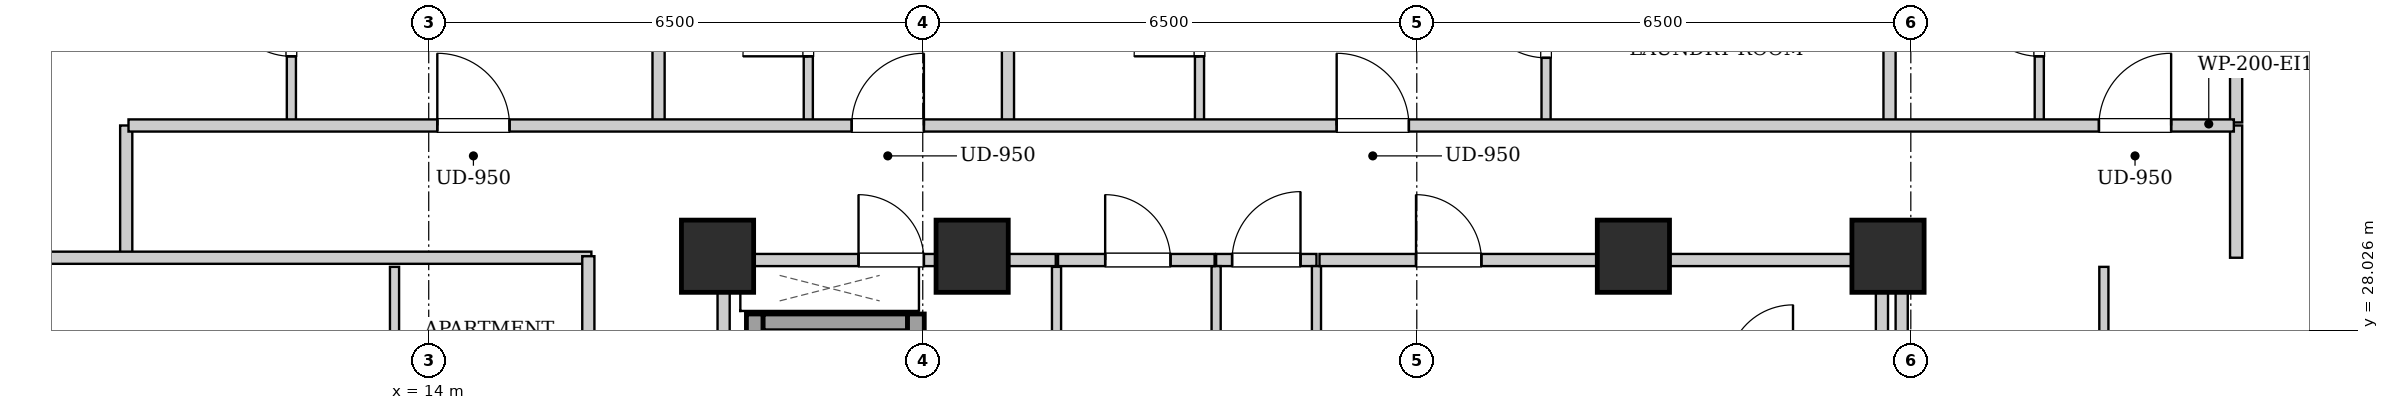
"""IFC4 building model, lengths in metres.
Left out: names, types, materials, properties, quantities, classifications, styles, units other than length and angle.
Written with IfcOpenShell. Run it as: python <this file> out.ifc"""

import sys

from ifc_helpers import new_model, si_unit, direction, frame, frame_2d, origin, origin_2d, place, context, subcontext, project, spatial, rectangle, extrude, element, fill, save


model = new_model("IFC4")
c1 = context("Model", 3, precision=1e-05, world=origin(), true_north=direction((0.0, 1.0)))
c2 = subcontext(c1, "Body", "Model", "MODEL_VIEW")
j1 = project(units=[si_unit("LENGTHUNIT", "METRE"), si_unit("PLANEANGLEUNIT", "RADIAN")], contexts=[c1])
p1 = place(None, origin())
s1 = spatial("IfcSite", under=j1, at=p1, CompositionType="ELEMENT")
p2 = place(p1, origin())
s2 = spatial("IfcBuilding", under=s1, at=p2, CompositionType="ELEMENT")
p3 = place(p2, frame((0.0, 0.0, 140.65)))
s3 = spatial("IfcBuildingStorey", under=s2, at=p3, CompositionType="ELEMENT", Elevation=140.65)
for number, where, z_axis, x_axis in (
    (1, (17.8, 29.0, 0.0), (0.0, 0.0, 1.0), (1.0, 0.0, 0.0)),
    (2, (21.15, 29.0, 0.0), (0.0, 0.0, 1.0), (1.0, 0.0, 0.0)),
    (3, (29.85, 29.0, 0.0), (0.0, 0.0, 1.0), (1.0, 0.0, 0.0)),
    (4, (33.2, 29.0, 0.0), (0.0, 0.0, 1.0), (1.0, 0.0, 0.0)),
):
    element("IfcColumn", number, at=place(p3, frame(where, z_axis=z_axis, x_axis=x_axis)), inside=s3, PredefinedType="COLUMN", context=c2, shape_type="SweptSolid", body=[
        extrude(rectangle(XDim=0.95, YDim=0.95, at=origin_2d()), origin(), (0.0, 0.0, 1.0), 3.25),
    ])
p4 = place(p3, frame((18.29, 24.1, 0.0), z_axis=(0.0, 0.0, 1.0), x_axis=(0.0, 1.0, 0.0)))
e5 = element("IfcWall", 5, at=p4, inside=s3, PredefinedType="SHEAR", context=c2, shape_type="SweptSolid", body=[
    extrude(rectangle(XDim=4.14, YDim=0.22, at=frame_2d((2.07, 0.0))), origin(), (0.0, 0.0, 1.0), 2.99),
])
p5 = place(p3, frame((18.4, 28.13, 0.0), z_axis=(0.0, 0.0, 1.0), x_axis=(1.0, 0.0, 0.0)))
e6 = element("IfcWall", 6, at=p5, inside=s3, PredefinedType="SHEAR", context=c2, shape_type="SweptSolid", body=[
    extrude(rectangle(XDim=1.9, YDim=0.22, at=frame_2d((0.95, 0.0))), origin(), (0.0, 0.0, 1.0), 2.99),
])
p6 = place(p3, frame((20.41, 26.06, 0.0), z_axis=(0.0, 0.0, 1.0), x_axis=(0.0, 1.0, 0.0)))
e7 = element("IfcWall", 7, at=p6, inside=s3, PredefinedType="SHEAR", context=c2, shape_type="SweptSolid", body=[
    extrude(rectangle(XDim=2.18, YDim=0.22, at=frame_2d((1.09, 0.0))), origin(), (0.0, 0.0, 1.0), 2.99),
])
for number, where, z_axis, x_axis in (
    (8, (17.88, 24.12, 0.0), (0.0, 0.0, 1.0), (0.0, 1.0, 0.0)),
    (9, (33.12, 24.12, 0.0), (0.0, 0.0, 1.0), (0.0, 1.0, 0.0)),
):
    element("IfcWall", number, at=place(p3, frame(where, z_axis=z_axis, x_axis=x_axis)), inside=s3, PredefinedType="PARTITIONING", context=c2, shape_type="SweptSolid", body=[
        extrude(rectangle(XDim=4.76, YDim=0.16, at=frame_2d((2.38, 0.0))), origin(), (0.0, 0.0, 1.0), 2.99),
    ])
p7 = place(p3, frame((24.36, 28.95, 0.0), z_axis=(0.0, 0.0, 1.0), x_axis=(1.0, 0.0, 0.0)))
e10 = element("IfcWall", 10, at=p7, inside=s3, PredefinedType="PARTITIONING", context=c2, shape_type="SweptSolid", body=[
    extrude(rectangle(XDim=1.32, YDim=0.16, at=frame_2d((0.66, 0.0))), origin(), (0.0, 0.0, 1.0), 2.426),
])
p8 = place(p7, frame((0.21, 0.0, 0.0)))
e11 = element("IfcOpeningElement", 11, at=p8, cuts=e10, PredefinedType="OPENING", context=c2, shape_type="SweptSolid", body=[
    extrude(rectangle(XDim=0.9, YDim=2.05, at=frame_2d((0.45, 1.025))), frame((0.0, 0.09, 0.0), z_axis=(0.0, -1.0, 0.0), x_axis=(1.0, 0.0, 0.0)), (0.0, 0.0, 1.0), 0.18),
])
p9 = place(p3, frame((17.96, 28.95, 0.0), z_axis=(0.0, 0.0, 1.0), x_axis=(1.0, 0.0, 0.0)))
e12 = element("IfcWall", 12, at=p9, inside=s3, PredefinedType="PARTITIONING", context=c2, shape_type="SweptSolid", body=[
    extrude(rectangle(XDim=4.29, YDim=0.16, at=frame_2d((2.145, 0.0))), origin(), (0.0, 0.0, 1.0), 2.426),
])
p10 = place(p9, frame((1.695, 0.0, 0.0)))
e13 = element("IfcOpeningElement", 13, at=p10, cuts=e12, PredefinedType="OPENING", context=c2, shape_type="SweptSolid", body=[
    extrude(rectangle(XDim=0.86, YDim=2.05, at=frame_2d((0.43, 1.025))), frame((0.0, 0.09, 0.0), z_axis=(0.0, -1.0, 0.0), x_axis=(1.0, 0.0, 0.0)), (0.0, 0.0, 1.0), 0.18),
])
for number, where, z_axis, x_axis in (
    (14, (24.36, 25.0, 0.0), (0.0, 0.0, 1.0), (0.0, 1.0, 0.0)),
    (15, (25.68, 25.0, 0.0), (0.0, 0.0, 1.0), (0.0, 1.0, 0.0)),
):
    element("IfcWall", number, at=place(p3, frame(where, z_axis=z_axis, x_axis=x_axis)), inside=s3, PredefinedType="PARTITIONING", context=c2, shape_type="SweptSolid", body=[
        extrude(rectangle(XDim=3.87, YDim=0.12, at=frame_2d((1.935, 0.0))), origin(), (0.0, 0.0, 1.0), 2.99),
    ])
p11 = place(p3, frame((22.26, 25.0, 0.0), z_axis=(0.0, 0.0, 1.0), x_axis=(0.0, 1.0, 0.0)))
e16 = element("IfcWall", 16, at=p11, inside=s3, PredefinedType="PARTITIONING", context=c2, shape_type="SweptSolid", body=[
    extrude(rectangle(XDim=3.86, YDim=0.12, at=frame_2d((1.93, 0.0))), origin(), (0.0, 0.0, 1.0), 2.99),
])
p12 = place(p3, frame((22.28, 28.95, 0.0), z_axis=(0.0, 0.0, 1.0), x_axis=(1.0, 0.0, 0.0)))
e17 = element("IfcWall", 17, at=p12, inside=s3, PredefinedType="PARTITIONING", context=c2, shape_type="SweptSolid", body=[
    extrude(rectangle(XDim=2.06, YDim=0.16, at=frame_2d((1.03, 0.0))), origin(), (0.0, 0.0, 1.0), 2.426),
])
p13 = place(p12, frame((0.62, 0.0, 0.0)))
e18 = element("IfcOpeningElement", 18, at=p13, cuts=e17, PredefinedType="OPENING", context=c2, shape_type="SweptSolid", body=[
    extrude(rectangle(XDim=0.86, YDim=2.05, at=frame_2d((0.43, 1.025))), frame((0.0, 0.09, 0.0), z_axis=(0.0, -1.0, 0.0), x_axis=(1.0, 0.0, 0.0)), (0.0, 0.0, 1.0), 0.18),
])
p14 = place(p3, frame((25.72, 28.95, 0.0), z_axis=(0.0, 0.0, 1.0), x_axis=(1.0, 0.0, 0.0)))
e19 = element("IfcWall", 19, at=p14, inside=s3, PredefinedType="PARTITIONING", context=c2, shape_type="SweptSolid", body=[
    extrude(rectangle(XDim=7.32, YDim=0.16, at=frame_2d((3.66, 0.0))), origin(), (0.0, 0.0, 1.0), 2.426),
])
p15 = place(p14, frame((1.27, 0.0, 0.0)))
e20 = element("IfcOpeningElement", 20, at=p15, cuts=e19, PredefinedType="OPENING", context=c2, shape_type="SweptSolid", body=[
    extrude(rectangle(XDim=0.86, YDim=2.05, at=frame_2d((0.43, 1.025))), frame((0.0, 0.09, 0.0), z_axis=(0.0, -1.0, 0.0), x_axis=(1.0, 0.0, 0.0)), (0.0, 0.0, 1.0), 0.18),
])
for number, where, z_axis, x_axis in (
    (21, (10.02, 28.98, 0.0), (0.0, 0.0, 1.0), (0.0, 1.0, 0.0)),
    (22, (37.78, 28.98, 0.0), (0.0, 0.0, 1.0), (0.0, 1.0, 0.0)),
):
    element("IfcWall", number, at=place(p3, frame(where, z_axis=z_axis, x_axis=x_axis)), inside=s3, PredefinedType="PARTITIONING", context=c2, shape_type="SweptSolid", body=[
        extrude(rectangle(XDim=1.74, YDim=0.16, at=frame_2d((0.87, 0.0))), origin(), (0.0, 0.0, 1.0), 2.99),
    ])
p16 = place(p3, frame((7.78, 28.98, 0.0), z_axis=(0.0, 0.0, 1.0), x_axis=(1.0, 0.0, 0.0)))
e23 = element("IfcWall", 23, at=p16, inside=s3, PredefinedType="PARTITIONING", context=c2, shape_type="SweptSolid", body=[
    extrude(rectangle(XDim=8.36, YDim=0.16, at=frame_2d((4.18, 0.0))), origin(), (0.0, 0.0, 1.0), 2.426),
])
p17 = place(p3, frame((12.193, 30.76, 0.0), z_axis=(0.0, 0.0, 1.0), x_axis=(0.0, 1.0, 0.0)))
e24 = element("IfcWall", 24, at=p17, inside=s3, PredefinedType="PARTITIONING", context=c2, shape_type="SweptSolid", body=[
    extrude(rectangle(XDim=2.6, YDim=0.12, at=frame_2d((1.3, 0.0))), origin(), (0.0, 0.0, 1.0), 2.99),
])
p18 = place(p17, frame((0.87, 0.0, 0.0)))
e25 = element("IfcOpeningElement", 25, at=p18, cuts=e24, PredefinedType="OPENING", context=c2, shape_type="SweptSolid", body=[
    extrude(rectangle(XDim=0.86, YDim=2.05, at=frame_2d((0.43, 1.025))), frame((0.0, 0.07, 0.0), z_axis=(0.0, -1.0, 0.0), x_axis=(1.0, 0.0, 0.0)), (0.0, 0.0, 1.0), 0.14),
])
p19 = place(p3, frame((17.024, 30.76, 0.0), z_axis=(0.0, 0.0, 1.0), x_axis=(0.0, 1.0, 0.0)))
e26 = element("IfcWall", 26, at=p19, inside=s3, PredefinedType="PARTITIONING", context=c2, shape_type="SweptSolid", body=[
    extrude(rectangle(XDim=12.26, YDim=0.16, at=frame_2d((6.13, 0.0))), origin(), (0.0, 0.0, 1.0), 2.99),
])
p20 = place(p3, frame((18.994, 30.76, 0.0), z_axis=(0.0, 0.0, 1.0), x_axis=(0.0, 1.0, 0.0)))
e27 = element("IfcWall", 27, at=p20, inside=s3, PredefinedType="PARTITIONING", context=c2, shape_type="SweptSolid", body=[
    extrude(rectangle(XDim=2.6, YDim=0.12, at=frame_2d((1.3, 0.0))), origin(), (0.0, 0.0, 1.0), 2.99),
])
p21 = place(p20, frame((0.87, 0.0, 0.0)))
e28 = element("IfcOpeningElement", 28, at=p21, cuts=e27, PredefinedType="OPENING", context=c2, shape_type="SweptSolid", body=[
    extrude(rectangle(XDim=0.86, YDim=2.05, at=frame_2d((0.43, 1.025))), frame((0.0, 0.07, 0.0), z_axis=(0.0, -1.0, 0.0), x_axis=(1.0, 0.0, 0.0)), (0.0, 0.0, 1.0), 0.14),
])
p22 = place(p3, frame((21.621, 30.76, 0.0), z_axis=(0.0, 0.0, 1.0), x_axis=(0.0, 1.0, 0.0)))
e29 = element("IfcWall", 29, at=p22, inside=s3, PredefinedType="PARTITIONING", context=c2, shape_type="SweptSolid", body=[
    extrude(rectangle(XDim=12.26, YDim=0.16, at=frame_2d((6.13, 0.0))), origin(), (0.0, 0.0, 1.0), 2.99),
])
p23 = place(p3, frame((24.141, 30.76, 0.0), z_axis=(0.0, 0.0, 1.0), x_axis=(0.0, 1.0, 0.0)))
e30 = element("IfcWall", 30, at=p23, inside=s3, PredefinedType="PARTITIONING", context=c2, shape_type="SweptSolid", body=[
    extrude(rectangle(XDim=2.6, YDim=0.12, at=frame_2d((1.3, 0.0))), origin(), (0.0, 0.0, 1.0), 2.99),
])
p24 = place(p23, frame((0.87, 0.0, 0.0)))
e31 = element("IfcOpeningElement", 31, at=p24, cuts=e30, PredefinedType="OPENING", context=c2, shape_type="SweptSolid", body=[
    extrude(rectangle(XDim=0.86, YDim=2.05, at=frame_2d((0.43, 1.025))), frame((0.0, 0.07, 0.0), z_axis=(0.0, -1.0, 0.0), x_axis=(1.0, 0.0, 0.0)), (0.0, 0.0, 1.0), 0.14),
])
p25 = place(p3, frame((28.701, 30.76, 0.0), z_axis=(0.0, 0.0, 1.0), x_axis=(0.0, 1.0, 0.0)))
e32 = element("IfcWall", 32, at=p25, inside=s3, PredefinedType="PARTITIONING", context=c2, shape_type="SweptSolid", body=[
    extrude(rectangle(XDim=2.6, YDim=0.12, at=frame_2d((1.3, 0.0))), origin(), (0.0, 0.0, 1.0), 2.99),
])
p26 = place(p25, frame((0.85, 0.0, 0.0)))
e33 = element("IfcOpeningElement", 33, at=p26, cuts=e32, PredefinedType="OPENING", context=c2, shape_type="SweptSolid", body=[
    extrude(rectangle(XDim=0.9, YDim=2.05, at=frame_2d((0.45, 1.025))), frame((0.0, 0.07, 0.0), z_axis=(0.0, -1.0, 0.0), x_axis=(1.0, 0.0, 0.0)), (0.0, 0.0, 1.0), 0.14),
])
p27 = place(p3, frame((37.78, 30.76, 0.0), z_axis=(0.0, 0.0, 1.0), x_axis=(0.0, 1.0, 0.0)))
e34 = element("IfcWall", 34, at=p27, inside=s3, PredefinedType="PARTITIONING", context=c2, shape_type="SweptSolid", body=[
    extrude(rectangle(XDim=2.66, YDim=0.16, at=frame_2d((1.33, 0.0))), origin(), (0.0, 0.0, 1.0), 2.99),
])
p28 = place(p3, frame((33.22, 30.76, 0.0), z_axis=(0.0, 0.0, 1.0), x_axis=(0.0, 1.0, 0.0)))
e35 = element("IfcWall", 35, at=p28, inside=s3, PredefinedType="PARTITIONING", context=c2, shape_type="SweptSolid", body=[
    extrude(rectangle(XDim=10.28, YDim=0.16, at=frame_2d((5.14, 0.0))), origin(), (0.0, 0.0, 1.0), 2.426),
])
p29 = place(p3, frame((35.19, 30.76, 0.0), z_axis=(0.0, 0.0, 1.0), x_axis=(0.0, 1.0, 0.0)))
e36 = element("IfcWall", 36, at=p29, inside=s3, PredefinedType="PARTITIONING", context=c2, shape_type="SweptSolid", body=[
    extrude(rectangle(XDim=2.6, YDim=0.12, at=frame_2d((1.3, 0.0))), origin(), (0.0, 0.0, 1.0), 2.99),
])
p30 = place(p29, frame((0.87, 0.0, 0.0)))
e37 = element("IfcOpeningElement", 37, at=p30, cuts=e36, PredefinedType="OPENING", context=c2, shape_type="SweptSolid", body=[
    extrude(rectangle(XDim=0.86, YDim=2.05, at=frame_2d((0.43, 1.025))), frame((0.0, 0.07, 0.0), z_axis=(0.0, -1.0, 0.0), x_axis=(1.0, 0.0, 0.0)), (0.0, 0.0, 1.0), 0.14),
])
p31 = place(p3, frame((13.55, 23.527, 0.0), z_axis=(0.0, 0.0, 1.0), x_axis=(0.0, 1.0, 0.0)))
e38 = element("IfcWall", 38, at=p31, inside=s3, PredefinedType="PARTITIONING", context=c2, shape_type="SweptSolid", body=[
    extrude(rectangle(XDim=5.333, YDim=0.12, at=frame_2d((2.667, 0.0))), origin(), (0.0, 0.0, 1.0), 2.99),
])
p32 = place(p31, frame((2.216, 0.0, 0.0)))
e39 = element("IfcOpeningElement", 39, at=p32, cuts=e38, PredefinedType="OPENING", context=c2, shape_type="SweptSolid", body=[
    extrude(rectangle(XDim=0.9, YDim=2.05, at=frame_2d((0.45, 1.025))), frame((0.0, 0.07, 0.0), z_axis=(0.0, -1.0, 0.0), x_axis=(1.0, 0.0, 0.0)), (0.0, 0.0, 1.0), 0.14),
])
p33 = place(p3, frame((36.04, 24.552, 0.0), z_axis=(0.0, 0.0, 1.0), x_axis=(0.0, 1.0, 0.0)))
e40 = element("IfcWall", 40, at=p33, inside=s3, PredefinedType="PARTITIONING", context=c2, shape_type="SweptSolid", body=[
    extrude(rectangle(XDim=4.308, YDim=0.12, at=frame_2d((2.154, 0.0))), origin(), (0.0, 0.0, 1.0), 2.99),
])
p34 = place(p33, frame((1.704, 0.0, 0.0)))
e41 = element("IfcOpeningElement", 41, at=p34, cuts=e40, PredefinedType="OPENING", context=c2, shape_type="SweptSolid", body=[
    extrude(rectangle(XDim=0.9, YDim=2.05, at=frame_2d((0.45, 1.025))), frame((0.0, 0.07, 0.0), z_axis=(0.0, -1.0, 0.0), x_axis=(1.0, 0.0, 0.0)), (0.0, 0.0, 1.0), 0.14),
])
p35 = place(p3, frame((10.05, 30.72, 0.0), z_axis=(0.0, 0.0, 1.0), x_axis=(1.0, 0.0, 0.0)))
e42 = element("IfcWall", 42, at=p35, inside=s3, PredefinedType="PARTITIONING", context=c2, shape_type="SweptSolid", body=[
    extrude(rectangle(XDim=27.7, YDim=0.16, at=frame_2d((13.85, 0.0))), origin(), (0.0, 0.0, 1.0), 2.99),
])
p36 = place(p35, frame((4.063, 0.0, 0.0)))
e43 = element("IfcOpeningElement", 43, at=p36, cuts=e42, PredefinedType="OPENING", context=c2, shape_type="SweptSolid", body=[
    extrude(rectangle(XDim=0.95, YDim=2.1, at=frame_2d((0.475, 1.05))), frame((0.0, 0.09, 0.0), z_axis=(0.0, -1.0, 0.0), x_axis=(1.0, 0.0, 0.0)), (0.0, 0.0, 1.0), 0.18),
])
p37 = place(p35, frame((9.515, 0.0, 0.0)))
e44 = element("IfcOpeningElement", 44, at=p37, cuts=e42, PredefinedType="OPENING", context=c2, shape_type="SweptSolid", body=[
    extrude(rectangle(XDim=0.95, YDim=2.1, at=frame_2d((0.475, 1.05))), frame((0.0, 0.09, 0.0), z_axis=(0.0, -1.0, 0.0), x_axis=(1.0, 0.0, 0.0)), (0.0, 0.0, 1.0), 0.18),
])
p38 = place(p35, frame((15.896, 0.0, 0.0)))
e45 = element("IfcOpeningElement", 45, at=p38, cuts=e42, PredefinedType="OPENING", context=c2, shape_type="SweptSolid", body=[
    extrude(rectangle(XDim=0.95, YDim=2.1, at=frame_2d((0.475, 1.05))), frame((0.0, 0.09, 0.0), z_axis=(0.0, -1.0, 0.0), x_axis=(1.0, 0.0, 0.0)), (0.0, 0.0, 1.0), 0.18),
])
p39 = place(p35, frame((25.925, 0.0, 0.0)))
e46 = element("IfcOpeningElement", 46, at=p39, cuts=e42, PredefinedType="OPENING", context=c2, shape_type="SweptSolid", body=[
    extrude(rectangle(XDim=0.95, YDim=2.1, at=frame_2d((0.475, 1.05))), frame((0.0, 0.09, 0.0), z_axis=(0.0, -1.0, 0.0), x_axis=(1.0, 0.0, 0.0)), (0.0, 0.0, 1.0), 0.18),
])
p40 = place(p3, frame((16.1, 15.07, 0.0), z_axis=(0.0, 0.0, 1.0), x_axis=(0.0, 1.0, 0.0)))
e47 = element("IfcWall", 47, at=p40, inside=s3, PredefinedType="PARTITIONING", context=c2, shape_type="SweptSolid", body=[
    extrude(rectangle(XDim=13.93, YDim=0.16, at=frame_2d((6.965, 0.0))), origin(), (0.0, 0.0, 1.0), 2.99),
])
p41 = place(p40, frame((3.608, 0.0, 0.0)))
e48 = element("IfcOpeningElement", 48, at=p41, cuts=e47, PredefinedType="OPENING", context=c2, shape_type="SweptSolid", body=[
    extrude(rectangle(XDim=0.95, YDim=2.1, at=frame_2d((0.475, 1.05))), frame((0.0, 0.09, 0.0), z_axis=(0.0, -1.0, 0.0), x_axis=(1.0, 0.0, 0.0)), (0.0, 0.0, 1.0), 0.18),
])
p42 = place(p40, frame((10.649, 0.0, 0.0)))
e49 = element("IfcOpeningElement", 49, at=p42, cuts=e47, PredefinedType="OPENING", context=c2, shape_type="SweptSolid", body=[
    extrude(rectangle(XDim=0.95, YDim=2.1, at=frame_2d((0.475, 1.05))), frame((0.0, 0.09, 0.0), z_axis=(0.0, -1.0, 0.0), x_axis=(1.0, 0.0, 0.0)), (0.0, 0.0, 1.0), 0.18),
])
p43 = place(p3, frame((33.38, 15.02, 0.0), z_axis=(0.0, 0.0, 1.0), x_axis=(0.0, 1.0, 0.0)))
e50 = element("IfcWall", 50, at=p43, inside=s3, PredefinedType="PARTITIONING", context=c2, shape_type="SweptSolid", body=[
    extrude(rectangle(XDim=13.98, YDim=0.16, at=frame_2d((6.99, 0.0))), origin(), (0.0, 0.0, 1.0), 2.99),
])
p44 = place(p8, origin())
e51 = element("IfcDoor", 51, at=p44, inside=s3, OperationType="SINGLE_SWING_RIGHT", PredefinedType="DOOR", context=c2, shape_type="SweptSolid", body=[
    extrude(rectangle(XDim=0.9, YDim=2.05, at=frame_2d((0.45, 1.025))), frame((0.0, 0.025, 0.0), z_axis=(0.0, -1.0, 0.0), x_axis=(1.0, 0.0, 0.0)), (0.0, 0.0, 1.0), 0.05),
])
fill(e11, e51)
p45 = place(p10, origin())
e52 = element("IfcDoor", 52, at=p45, inside=s3, OperationType="SINGLE_SWING_LEFT", PredefinedType="DOOR", context=c2, shape_type="SweptSolid", body=[
    extrude(rectangle(XDim=0.86, YDim=2.05, at=frame_2d((0.43, 1.025))), frame((0.0, 0.025, 0.0), z_axis=(0.0, -1.0, 0.0), x_axis=(1.0, 0.0, 0.0)), (0.0, 0.0, 1.0), 0.05),
])
fill(e13, e52)
p46 = place(p13, origin())
e53 = element("IfcDoor", 53, at=p46, inside=s3, OperationType="SINGLE_SWING_LEFT", PredefinedType="DOOR", context=c2, shape_type="SweptSolid", body=[
    extrude(rectangle(XDim=0.86, YDim=2.05, at=frame_2d((0.43, 1.025))), frame((0.0, 0.025, 0.0), z_axis=(0.0, -1.0, 0.0), x_axis=(1.0, 0.0, 0.0)), (0.0, 0.0, 1.0), 0.05),
])
fill(e18, e53)
p47 = place(p15, origin())
e54 = element("IfcDoor", 54, at=p47, inside=s3, OperationType="SINGLE_SWING_LEFT", PredefinedType="DOOR", context=c2, shape_type="SweptSolid", body=[
    extrude(rectangle(XDim=0.86, YDim=2.05, at=frame_2d((0.43, 1.025))), frame((0.0, 0.025, 0.0), z_axis=(0.0, -1.0, 0.0), x_axis=(1.0, 0.0, 0.0)), (0.0, 0.0, 1.0), 0.05),
])
fill(e20, e54)
p48 = place(p18, origin())
e55 = element("IfcDoor", 55, at=p48, inside=s3, OperationType="SINGLE_SWING_RIGHT", PredefinedType="DOOR", context=c2, shape_type="SweptSolid", body=[
    extrude(rectangle(XDim=0.86, YDim=2.05, at=frame_2d((0.43, 1.025))), frame((0.0, 0.025, 0.0), z_axis=(0.0, -1.0, 0.0), x_axis=(1.0, 0.0, 0.0)), (0.0, 0.0, 1.0), 0.05),
])
fill(e25, e55)
p49 = place(p21, origin())
e56 = element("IfcDoor", 56, at=p49, inside=s3, OperationType="SINGLE_SWING_LEFT", PredefinedType="DOOR", context=c2, shape_type="SweptSolid", body=[
    extrude(rectangle(XDim=0.86, YDim=2.05, at=frame_2d((0.43, 1.025))), frame((0.0, 0.025, 0.0), z_axis=(0.0, -1.0, 0.0), x_axis=(1.0, 0.0, 0.0)), (0.0, 0.0, 1.0), 0.05),
])
fill(e28, e56)
p50 = place(p24, origin())
e57 = element("IfcDoor", 57, at=p50, inside=s3, OperationType="SINGLE_SWING_LEFT", PredefinedType="DOOR", context=c2, shape_type="SweptSolid", body=[
    extrude(rectangle(XDim=0.86, YDim=2.05, at=frame_2d((0.43, 1.025))), frame((0.0, 0.025, 0.0), z_axis=(0.0, -1.0, 0.0), x_axis=(1.0, 0.0, 0.0)), (0.0, 0.0, 1.0), 0.05),
])
fill(e31, e57)
p51 = place(p26, origin())
e58 = element("IfcDoor", 58, at=p51, inside=s3, OperationType="SINGLE_SWING_RIGHT", PredefinedType="DOOR", context=c2, shape_type="SweptSolid", body=[
    extrude(rectangle(XDim=0.9, YDim=2.05, at=frame_2d((0.45, 1.025))), frame((0.0, 0.025, 0.0), z_axis=(0.0, -1.0, 0.0), x_axis=(1.0, 0.0, 0.0)), (0.0, 0.0, 1.0), 0.05),
])
fill(e33, e58)
p52 = place(p30, origin())
e59 = element("IfcDoor", 59, at=p52, inside=s3, OperationType="SINGLE_SWING_RIGHT", PredefinedType="DOOR", context=c2, shape_type="SweptSolid", body=[
    extrude(rectangle(XDim=0.86, YDim=2.05, at=frame_2d((0.43, 1.025))), frame((0.0, 0.025, 0.0), z_axis=(0.0, -1.0, 0.0), x_axis=(1.0, 0.0, 0.0)), (0.0, 0.0, 1.0), 0.05),
])
fill(e37, e59)
p53 = place(p36, origin())
e60 = element("IfcDoor", 60, at=p53, inside=s3, OperationType="SINGLE_SWING_LEFT", PredefinedType="DOOR", context=c2, shape_type="SweptSolid", body=[
    extrude(rectangle(XDim=0.95, YDim=2.1, at=frame_2d((0.475, 1.05))), frame((0.0, 0.025, 0.0), z_axis=(0.0, -1.0, 0.0), x_axis=(1.0, 0.0, 0.0)), (0.0, 0.0, 1.0), 0.05),
])
fill(e43, e60)
p54 = place(p37, origin())
e61 = element("IfcDoor", 61, at=p54, inside=s3, OperationType="SINGLE_SWING_RIGHT", PredefinedType="DOOR", context=c2, shape_type="SweptSolid", body=[
    extrude(rectangle(XDim=0.95, YDim=2.1, at=frame_2d((0.475, 1.05))), frame((0.0, 0.025, 0.0), z_axis=(0.0, -1.0, 0.0), x_axis=(1.0, 0.0, 0.0)), (0.0, 0.0, 1.0), 0.05),
])
fill(e44, e61)
p55 = place(p38, origin())
e62 = element("IfcDoor", 62, at=p55, inside=s3, OperationType="SINGLE_SWING_LEFT", PredefinedType="DOOR", context=c2, shape_type="SweptSolid", body=[
    extrude(rectangle(XDim=0.95, YDim=2.1, at=frame_2d((0.475, 1.05))), frame((0.0, 0.025, 0.0), z_axis=(0.0, -1.0, 0.0), x_axis=(1.0, 0.0, 0.0)), (0.0, 0.0, 1.0), 0.05),
])
fill(e45, e62)
p56 = place(p39, origin())
e63 = element("IfcDoor", 63, at=p56, inside=s3, OperationType="SINGLE_SWING_RIGHT", PredefinedType="DOOR", context=c2, shape_type="SweptSolid", body=[
    extrude(rectangle(XDim=0.95, YDim=2.1, at=frame_2d((0.475, 1.05))), frame((0.0, 0.025, 0.0), z_axis=(0.0, -1.0, 0.0), x_axis=(1.0, 0.0, 0.0)), (0.0, 0.0, 1.0), 0.05),
])
fill(e46, e63)
save(model, sys.argv[1])
